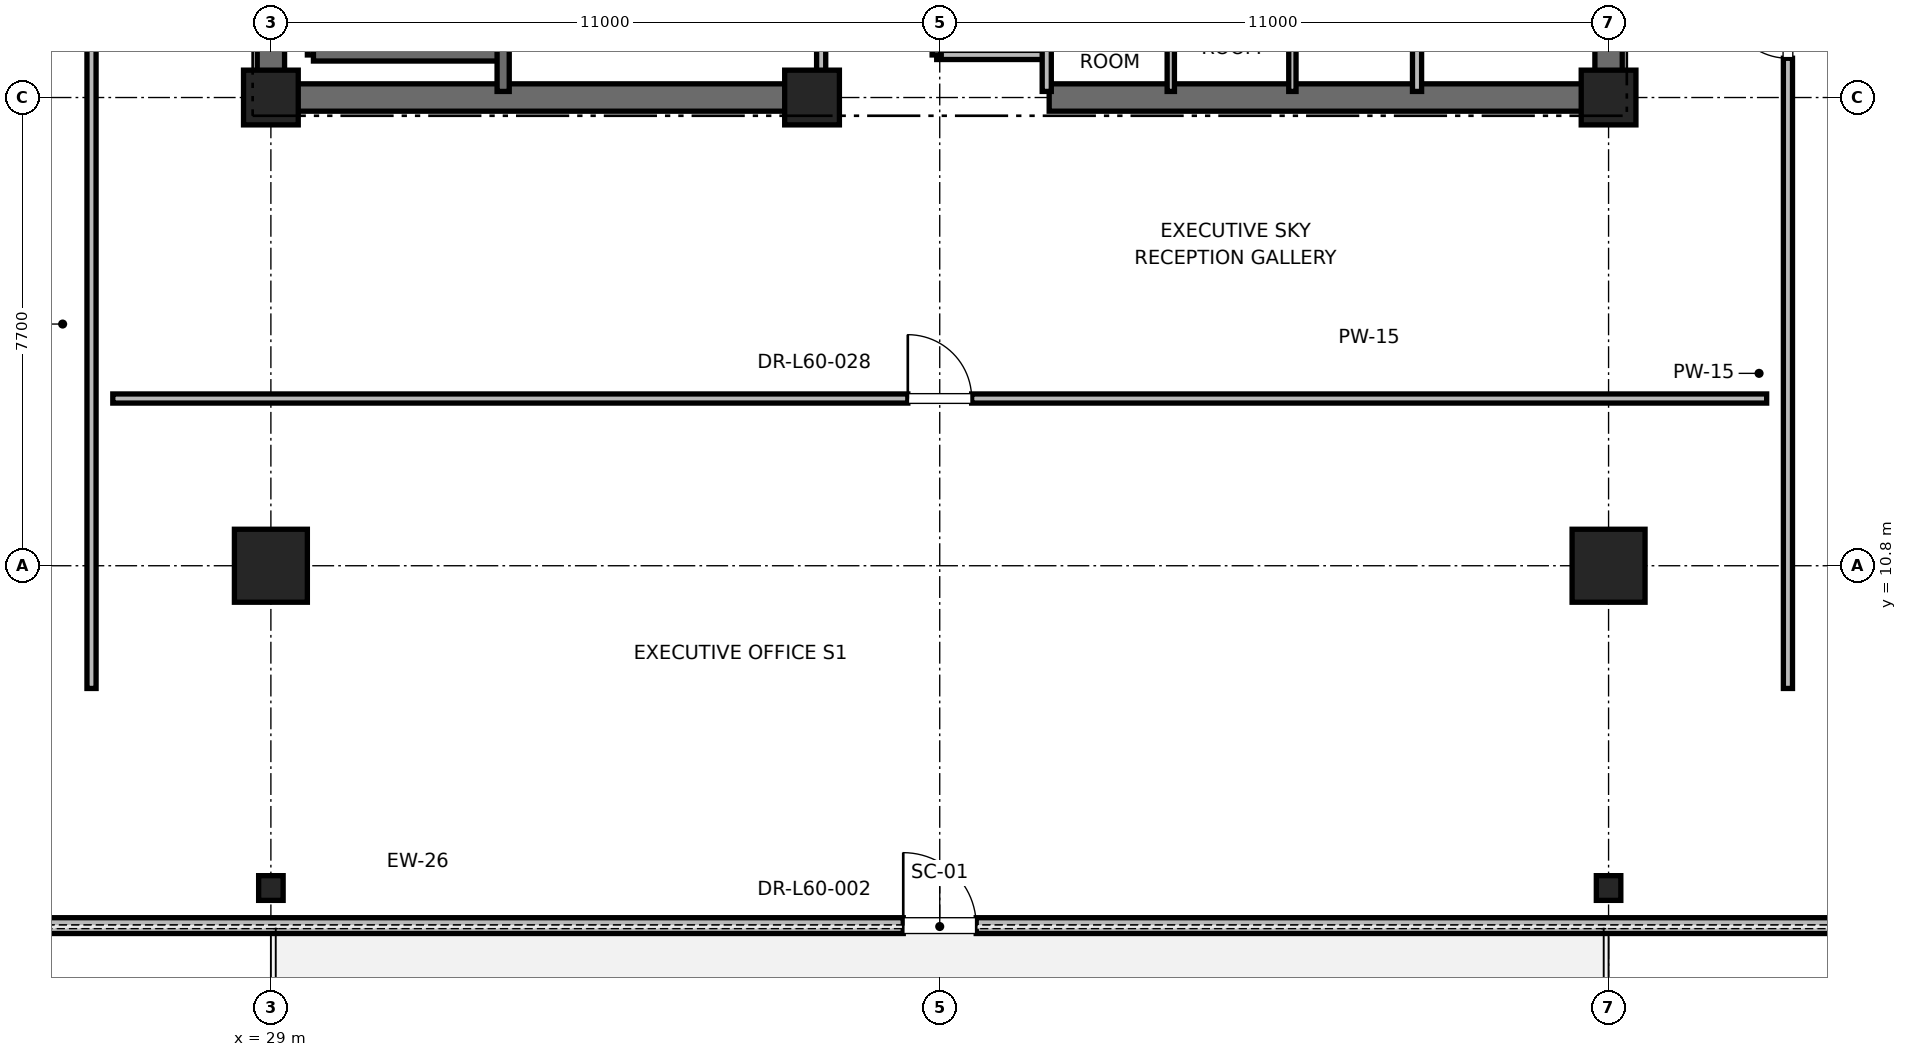
"""IFC4 building model, lengths in metres.
Left out: names, types, materials, properties, quantities, classifications, styles, units other than length and angle.
Written with IfcOpenShell. Run it as: python <this file> out.ifc"""

import sys

from ifc_helpers import new_model, si_unit, direction, frame, frame_2d, origin, origin_2d, place, context, subcontext, project, spatial, rectangle, i_section, extrude, element, fill, save


model = new_model("IFC4")
c1 = context("Model", 3, precision=1e-05, world=origin(), true_north=direction((0.0, 1.0)))
c2 = subcontext(c1, "Body", "Model", "MODEL_VIEW")
j1 = project(units=[si_unit("LENGTHUNIT", "METRE"), si_unit("PLANEANGLEUNIT", "RADIAN")], contexts=[c1])
p1 = place(None, origin())
s1 = spatial("IfcSite", under=j1, at=p1, CompositionType="ELEMENT")
p2 = place(p1, origin())
s2 = spatial("IfcBuilding", under=s1, at=p2, CompositionType="ELEMENT")
p3 = place(p2, frame((0.0, 0.0, 259.2)))
s3 = spatial("IfcBuildingStorey", under=s2, at=p3, CompositionType="ELEMENT", Elevation=259.2)
for number, where, z_axis, x_axis in (
    (1, (29.0, 10.8, 0.0), (0.0, 0.0, 1.0), (1.0, 0.0, 0.0)),
    (2, (51.0, 10.8, 0.0), (0.0, 0.0, 1.0), (1.0, 0.0, 0.0)),
):
    element("IfcColumn", number, at=place(p3, frame(where, z_axis=z_axis, x_axis=x_axis)), inside=s3, PredefinedType="COLUMN", context=c2, shape_type="SweptSolid", body=[
        extrude(rectangle(XDim=1.2, YDim=1.2, at=origin_2d()), origin(), (0.0, 0.0, 1.0), 4.0),
    ])
for number, where, z_axis, x_axis in (
    (3, (29.0, 5.5, 0.0), (0.0, 0.0, 1.0), (1.0, 0.0, 0.0)),
    (4, (51.0, 5.5, 0.0), (0.0, 0.0, 1.0), (1.0, 0.0, 0.0)),
):
    element("IfcColumn", number, at=place(p3, frame(where, z_axis=z_axis, x_axis=x_axis)), inside=s3, PredefinedType="COLUMN", context=c2, shape_type="SweptSolid", body=[
        extrude(i_section(OverallWidth=0.403, OverallDepth=0.406, WebThickness=0.027, FlangeThickness=0.043, FilletRadius=0.015, at=origin_2d()), origin(), (0.0, 0.0, 1.0), 4.0),
    ])
for number, where, z_axis, x_axis in (
    (5, (29.0, 18.5, 0.0), (0.0, 0.0, 1.0), (1.0, 0.0, 0.0)),
    (6, (51.0, 18.5, 0.0), (0.0, 0.0, 1.0), (1.0, 0.0, 0.0)),
    (7, (37.9, 18.5, 0.0), (0.0, 0.0, 1.0), (1.0, 0.0, 0.0)),
):
    element("IfcColumn", number, at=place(p3, frame(where, z_axis=z_axis, x_axis=x_axis)), inside=s3, PredefinedType="PILASTER", context=c2, shape_type="SweptSolid", body=[
        extrude(rectangle(XDim=0.9, YDim=0.9, at=origin_2d()), origin(), (0.0, 0.0, 1.0), 4.0),
    ])
for number, where, z_axis, x_axis in (
    (8, (29.0, 18.5, 0.0), (0.0, 0.0, 1.0), (1.0, 0.0, 0.0)),
    (9, (41.8, 18.5, 0.0), (0.0, 0.0, 1.0), (1.0, 0.0, 0.0)),
):
    element("IfcWall", number, at=place(p3, frame(where, z_axis=z_axis, x_axis=x_axis)), inside=s3, PredefinedType="SHEAR", context=c2, shape_type="SweptSolid", body=[
        extrude(rectangle(XDim=9.2, YDim=0.45, at=frame_2d((4.6, 0.0))), origin(), (0.0, 0.0, 1.0), 3.785),
    ])
p4 = place(p3, frame((29.0, 18.5, 0.0), z_axis=(0.0, 0.0, 1.0), x_axis=(0.0, 1.0, 0.0)))
e10 = element("IfcWall", 10, at=p4, inside=s3, PredefinedType="SHEAR", context=c2, shape_type="SweptSolid", body=[
    extrude(rectangle(XDim=8.8, YDim=0.45, at=frame_2d((4.4, 0.0))), origin(), (0.0, 0.0, 1.0), 3.785),
])
p5 = place(p3, frame((51.0, 18.5, 0.0), z_axis=(0.0, 0.0, 1.0), x_axis=(0.0, 1.0, 0.0)))
e11 = element("IfcWall", 11, at=p5, inside=s3, PredefinedType="SHEAR", context=c2, shape_type="SweptSolid", body=[
    extrude(rectangle(XDim=5.8, YDim=0.45, at=frame_2d((2.9, 0.0))), origin(), (0.0, 0.0, 1.0), 3.785),
])
p6 = place(p3, frame((17.634, 4.882, 0.0), z_axis=(0.0, 0.0, 1.0), x_axis=(1.0, 0.0, 0.0)))
e12 = element("IfcWall", 12, at=p6, inside=s3, PredefinedType="PARAPET", context=c2, shape_type="SweptSolid", body=[
    extrude(rectangle(XDim=44.733, YDim=0.26, at=frame_2d((22.366, 0.0))), origin(), (0.0, 0.0, 1.0), 3.273),
])
p7 = place(p6, frame((4.2, 0.0, 0.85)))
e13 = element("IfcOpeningElement", 13, at=p7, cuts=e12, PredefinedType="OPENING", context=c2, shape_type="SweptSolid", body=[
    extrude(rectangle(XDim=1.6, YDim=2.1, at=frame_2d((0.8, 1.05))), frame((0.0, 0.13, 0.0), z_axis=(0.0, -1.0, 0.0), x_axis=(1.0, 0.0, 0.0)), (0.0, 0.0, 1.0), 0.26),
])
p8 = place(p6, frame((21.767, 0.0, 0.0)))
e14 = element("IfcOpeningElement", 14, at=p8, cuts=e12, PredefinedType="OPENING", context=c2, shape_type="SweptSolid", body=[
    extrude(rectangle(XDim=1.2, YDim=2.2, at=frame_2d((0.6, 1.1))), frame((0.0, 0.13, 0.0), z_axis=(0.0, -1.0, 0.0), x_axis=(1.0, 0.0, 0.0)), (0.0, 0.0, 1.0), 0.26),
])
p9 = place(p6, frame((38.933, 0.0, 0.85)))
e15 = element("IfcOpeningElement", 15, at=p9, cuts=e12, PredefinedType="OPENING", context=c2, shape_type="SweptSolid", body=[
    extrude(rectangle(XDim=1.6, YDim=2.1, at=frame_2d((0.8, 1.05))), frame((0.0, 0.13, 0.0), z_axis=(0.0, -1.0, 0.0), x_axis=(1.0, 0.0, 0.0)), (0.0, 0.0, 1.0), 0.26),
])
p10 = place(p3, frame((29.7, 19.2, 0.0), z_axis=(0.0, 0.0, 1.0), x_axis=(0.0, 1.0, 0.0)))
e16 = element("IfcWall", 16, at=p10, inside=s3, PredefinedType="SOLIDWALL", context=c2, shape_type="SweptSolid", body=[
    extrude(rectangle(XDim=8.15, YDim=0.2, at=frame_2d((4.075, 0.0))), origin(), (0.0, 0.0, 1.0), 3.785),
])
p11 = place(p3, frame((29.7, 19.2, 0.0), z_axis=(0.0, 0.0, 1.0), x_axis=(1.0, 0.0, 0.0)))
e17 = element("IfcWall", 17, at=p11, inside=s3, PredefinedType="SOLIDWALL", context=c2, shape_type="SweptSolid", body=[
    extrude(rectangle(XDim=3.12, YDim=0.2, at=frame_2d((1.56, 0.0))), origin(), (0.0, 0.0, 1.0), 3.785),
])
p12 = place(p3, frame((32.82, 18.6, 0.0), z_axis=(0.0, 0.0, 1.0), x_axis=(0.0, 1.0, 0.0)))
e18 = element("IfcWall", 18, at=p12, inside=s3, PredefinedType="SOLIDWALL", context=c2, shape_type="SweptSolid", body=[
    extrude(rectangle(XDim=8.78, YDim=0.2, at=frame_2d((4.39, 0.0))), origin(), (0.0, 0.0, 1.0), 3.785),
])
p13 = place(p3, frame((39.95, 19.2, 0.0), z_axis=(0.0, 0.0, 1.0), x_axis=(1.0, 0.0, 0.0)))
e19 = element("IfcWall", 19, at=p13, inside=s3, PredefinedType="PARTITIONING", context=c2, shape_type="SweptSolid", body=[
    extrude(rectangle(XDim=1.81, YDim=0.15, at=frame_2d((0.905, 0.0))), origin(), (0.0, 0.0, 1.0), 2.85),
])
p14 = place(p3, frame((41.76, 18.6, 0.0), z_axis=(0.0, 0.0, 1.0), x_axis=(0.0, 1.0, 0.0)))
e20 = element("IfcWall", 20, at=p14, inside=s3, PredefinedType="PARTITIONING", context=c2, shape_type="SweptSolid", body=[
    extrude(rectangle(XDim=3.6, YDim=0.15, at=frame_2d((1.8, 0.0))), origin(), (0.0, 0.0, 1.0), 2.85),
])
p15 = place(p3, frame((39.95, 19.2, 0.0), z_axis=(0.0, 0.0, 1.0), x_axis=(0.0, 1.0, 0.0)))
e21 = element("IfcWall", 21, at=p15, inside=s3, PredefinedType="PARTITIONING", context=c2, shape_type="SweptSolid", body=[
    extrude(rectangle(XDim=3.0, YDim=0.15, at=frame_2d((1.5, 0.0))), origin(), (0.0, 0.0, 1.0), 2.85),
])
p16 = place(p15, frame((1.05, 0.0, 0.0)))
e22 = element("IfcOpeningElement", 22, at=p16, cuts=e21, PredefinedType="OPENING", context=c2, shape_type="SweptSolid", body=[
    extrude(rectangle(XDim=0.9, YDim=2.1, at=frame_2d((0.45, 1.05))), frame((0.0, 0.075, 0.0), z_axis=(0.0, -1.0, 0.0), x_axis=(1.0, 0.0, 0.0)), (0.0, 0.0, 1.0), 0.15),
])
p17 = place(p3, frame((38.05, 18.6, 0.0), z_axis=(0.0, 0.0, 1.0), x_axis=(0.0, 1.0, 0.0)))
e23 = element("IfcWall", 23, at=p17, inside=s3, PredefinedType="PARTITIONING", context=c2, shape_type="SweptSolid", body=[
    extrude(rectangle(XDim=3.06, YDim=0.15, at=frame_2d((1.53, 0.0))), origin(), (0.0, 0.0, 1.0), 2.85),
])
p18 = place(p17, frame((1.03, 0.0, 0.0)))
e24 = element("IfcOpeningElement", 24, at=p18, cuts=e23, PredefinedType="OPENING", context=c2, shape_type="SweptSolid", body=[
    extrude(rectangle(XDim=1.0, YDim=2.15, at=frame_2d((0.5, 1.075))), frame((0.0, 0.075, 0.0), z_axis=(0.0, -1.0, 0.0), x_axis=(1.0, 0.0, 0.0)), (0.0, 0.0, 1.0), 0.15),
])
p19 = place(p3, frame((47.85, 18.6, 0.0), z_axis=(0.0, 0.0, 1.0), x_axis=(0.0, 1.0, 0.0)))
e25 = element("IfcWall", 25, at=p19, inside=s3, PredefinedType="PARTITIONING", context=c2, shape_type="SweptSolid", body=[
    extrude(rectangle(XDim=2.54, YDim=0.15, at=frame_2d((1.27, 0.0))), origin(), (0.0, 0.0, 1.0), 2.85),
])
for number, where, z_axis, x_axis in (
    (26, (43.8, 18.6, 0.0), (0.0, 0.0, 1.0), (0.0, 1.0, 0.0)),
    (27, (45.8, 18.6, 0.0), (0.0, 0.0, 1.0), (0.0, 1.0, 0.0)),
):
    element("IfcWall", number, at=place(p3, frame(where, z_axis=z_axis, x_axis=x_axis)), inside=s3, PredefinedType="PARTITIONING", context=c2, shape_type="SweptSolid", body=[
        extrude(rectangle(XDim=3.02, YDim=0.12, at=frame_2d((1.51, 0.0))), origin(), (0.0, 0.0, 1.0), 2.85),
    ])
p20 = place(p3, frame((26.4, 13.55, 0.0), z_axis=(0.0, 0.0, 1.0), x_axis=(1.0, 0.0, 0.0)))
e28 = element("IfcWall", 28, at=p20, inside=s3, PredefinedType="PARTITIONING", context=c2, shape_type="SweptSolid", body=[
    extrude(rectangle(XDim=27.2, YDim=0.15, at=frame_2d((13.6, 0.0))), origin(), (0.0, 0.0, 1.0), 2.85),
])
p21 = place(p20, frame((13.075, 0.0, 0.0)))
e29 = element("IfcOpeningElement", 29, at=p21, cuts=e28, PredefinedType="OPENING", context=c2, shape_type="SweptSolid", body=[
    extrude(rectangle(XDim=1.05, YDim=2.2, at=frame_2d((0.525, 1.1))), frame((0.0, 0.075, 0.0), z_axis=(0.0, -1.0, 0.0), x_axis=(1.0, 0.0, 0.0)), (0.0, 0.0, 1.0), 0.15),
])
p22 = place(p3, frame((26.05, 8.782, 0.0), z_axis=(0.0, 0.0, 1.0), x_axis=(0.0, 1.0, 0.0)))
e30 = element("IfcWall", 30, at=p22, inside=s3, PredefinedType="PARTITIONING", context=c2, shape_type="SweptSolid", body=[
    extrude(rectangle(XDim=15.723, YDim=0.15, at=frame_2d((7.862, 0.0))), origin(), (0.0, 0.0, 1.0), 2.85),
])
p23 = place(p22, frame((11.986, 0.0, 0.0)))
e31 = element("IfcOpeningElement", 31, at=p23, cuts=e30, PredefinedType="OPENING", context=c2, shape_type="SweptSolid", body=[
    extrude(rectangle(XDim=1.5, YDim=2.25, at=frame_2d((0.75, 1.125))), frame((0.0, 0.075, 0.0), z_axis=(0.0, -1.0, 0.0), x_axis=(1.0, 0.0, 0.0)), (0.0, 0.0, 1.0), 0.15),
])
p24 = place(p3, frame((53.95, 8.782, 0.0), z_axis=(0.0, 0.0, 1.0), x_axis=(0.0, 1.0, 0.0)))
e32 = element("IfcWall", 32, at=p24, inside=s3, PredefinedType="PARTITIONING", context=c2, shape_type="SweptSolid", body=[
    extrude(rectangle(XDim=11.98, YDim=0.15, at=frame_2d((5.99, 0.0))), origin(), (0.0, 0.0, 1.0), 2.85),
])
p25 = place(p24, frame((10.364, 0.0, 0.0)))
e33 = element("IfcOpeningElement", 33, at=p25, cuts=e32, PredefinedType="OPENING", context=c2, shape_type="SweptSolid", body=[
    extrude(rectangle(XDim=1.0, YDim=2.15, at=frame_2d((0.5, 1.075))), frame((0.0, 0.075, 0.0), z_axis=(0.0, -1.0, 0.0), x_axis=(1.0, 0.0, 0.0)), (0.0, 0.0, 1.0), 0.15),
])
p26 = place(p8, origin())
e34 = element("IfcDoor", 34, at=p26, inside=s3, OperationType="SINGLE_SWING_LEFT", PredefinedType="DOOR", context=c2, shape_type="SweptSolid", body=[
    extrude(rectangle(XDim=1.2, YDim=2.2, at=frame_2d((0.6, 1.1))), frame((0.0, 0.025, 0.0), z_axis=(0.0, -1.0, 0.0), x_axis=(1.0, 0.0, 0.0)), (0.0, 0.0, 1.0), 0.05),
])
fill(e14, e34)
p27 = place(p21, origin())
e35 = element("IfcDoor", 35, at=p27, inside=s3, OperationType="SINGLE_SWING_LEFT", PredefinedType="DOOR", context=c2, shape_type="SweptSolid", body=[
    extrude(rectangle(XDim=1.05, YDim=2.2, at=frame_2d((0.525, 1.1))), frame((0.0, 0.025, 0.0), z_axis=(0.0, -1.0, 0.0), x_axis=(1.0, 0.0, 0.0)), (0.0, 0.0, 1.0), 0.05),
])
fill(e29, e35)
p28 = place(p25, origin())
e36 = element("IfcDoor", 36, at=p28, inside=s3, OperationType="SINGLE_SWING_RIGHT", PredefinedType="DOOR", context=c2, shape_type="SweptSolid", body=[
    extrude(rectangle(XDim=1.0, YDim=2.15, at=frame_2d((0.5, 1.075))), frame((0.0, 0.025, 0.0), z_axis=(0.0, -1.0, 0.0), x_axis=(1.0, 0.0, 0.0)), (0.0, 0.0, 1.0), 0.05),
])
fill(e33, e36)
save(model, sys.argv[1])
